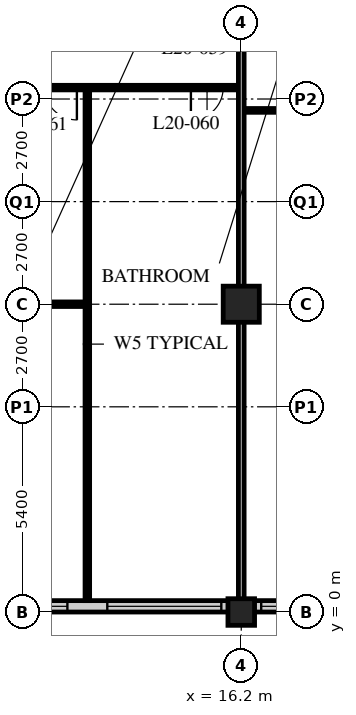
"""IFC4 building model, lengths in metres.
Left out: names, types, materials, properties, quantities, classifications, styles, units other than length and angle.
Written with IfcOpenShell. Run it as: python <this file> out.ifc"""

import sys

from ifc_helpers import new_model, si_unit, direction, frame, frame_2d, origin, origin_2d, place, context, subcontext, project, spatial, rectangle, hollow_rectangle, extrude, element, fill, save


model = new_model("IFC4")
c1 = context("Model", 3, precision=1e-05, world=origin(), true_north=direction((0.0, 1.0)))
c2 = subcontext(c1, "Body", "Model", "MODEL_VIEW")
j1 = project(units=[si_unit("LENGTHUNIT", "METRE"), si_unit("PLANEANGLEUNIT", "RADIAN")], contexts=[c1])
p1 = place(None, origin())
s1 = spatial("IfcSite", under=j1, at=p1, CompositionType="ELEMENT")
p2 = place(p1, origin())
s2 = spatial("IfcBuilding", under=s1, at=p2, CompositionType="ELEMENT")
p3 = place(p2, frame((0.0, 0.0, 80.6)))
s3 = spatial("IfcBuildingStorey", under=s2, at=p3, CompositionType="ELEMENT", Elevation=80.6)
p4 = place(p3, frame((16.2, 0.0, 0.0), z_axis=(0.0, 0.0, 1.0), x_axis=(1.0, 0.0, 0.0)))
e1 = element("IfcColumn", 1, at=p4, inside=s3, PredefinedType="COLUMN", context=c2, shape_type="SweptSolid", body=[
    extrude(hollow_rectangle(XDim=0.7, YDim=0.7, WallThickness=0.06, at=origin_2d()), origin(), (0.0, 0.0, 1.0), 3.4),
])
p5 = place(p3, frame((16.2, 8.1, 0.0), z_axis=(0.0, 0.0, 1.0), x_axis=(1.0, 0.0, 0.0)))
e2 = element("IfcColumn", 2, at=p5, inside=s3, PredefinedType="COLUMN", context=c2, shape_type="SweptSolid", body=[
    extrude(hollow_rectangle(XDim=0.95, YDim=0.95, WallThickness=0.095, at=origin_2d()), origin(), (0.0, 0.0, 1.0), 3.4),
])
p6 = place(p3, frame((8.4, 0.15, 0.0), z_axis=(0.0, 0.0, 1.0), x_axis=(1.0, 0.0, 0.0)))
e3 = element("IfcWall", 3, at=p6, inside=s3, PredefinedType="SOLIDWALL", context=c2, shape_type="SweptSolid", body=[
    extrude(rectangle(XDim=40.2, YDim=0.3, at=frame_2d((20.1, 0.0))), origin(), (0.0, 0.0, 1.0), 3.19),
])
p7 = place(p6, frame((0.225, 0.0, 0.9)))
e4 = element("IfcOpeningElement", 4, at=p7, cuts=e3, PredefinedType="OPENING", context=c2, shape_type="SweptSolid", body=[
    extrude(rectangle(XDim=3.0, YDim=1.5, at=frame_2d((1.5, 0.75))), frame((0.0, 0.16, 0.0), z_axis=(0.0, -1.0, 0.0), x_axis=(1.0, 0.0, 0.0)), (0.0, 0.0, 1.0), 0.32),
])
p8 = place(p6, frame((4.275, 0.0, 0.9)))
e5 = element("IfcOpeningElement", 5, at=p8, cuts=e3, PredefinedType="OPENING", context=c2, shape_type="SweptSolid", body=[
    extrude(rectangle(XDim=3.0, YDim=1.5, at=frame_2d((1.5, 0.75))), frame((0.0, 0.16, 0.0), z_axis=(0.0, -1.0, 0.0), x_axis=(1.0, 0.0, 0.0)), (0.0, 0.0, 1.0), 0.32),
])
p9 = place(p6, frame((8.325, 0.0, 0.9)))
e6 = element("IfcOpeningElement", 6, at=p9, cuts=e3, PredefinedType="OPENING", context=c2, shape_type="SweptSolid", body=[
    extrude(rectangle(XDim=3.0, YDim=1.5, at=frame_2d((1.5, 0.75))), frame((0.0, 0.16, 0.0), z_axis=(0.0, -1.0, 0.0), x_axis=(1.0, 0.0, 0.0)), (0.0, 0.0, 1.0), 0.32),
])
p10 = place(p6, frame((12.375, 0.0, 0.9)))
e7 = element("IfcOpeningElement", 7, at=p10, cuts=e3, PredefinedType="OPENING", context=c2, shape_type="SweptSolid", body=[
    extrude(rectangle(XDim=3.0, YDim=1.5, at=frame_2d((1.5, 0.75))), frame((0.0, 0.16, 0.0), z_axis=(0.0, -1.0, 0.0), x_axis=(1.0, 0.0, 0.0)), (0.0, 0.0, 1.0), 0.32),
])
p11 = place(p6, frame((16.425, 0.0, 0.9)))
e8 = element("IfcOpeningElement", 8, at=p11, cuts=e3, PredefinedType="OPENING", context=c2, shape_type="SweptSolid", body=[
    extrude(rectangle(XDim=3.0, YDim=1.5, at=frame_2d((1.5, 0.75))), frame((0.0, 0.16, 0.0), z_axis=(0.0, -1.0, 0.0), x_axis=(1.0, 0.0, 0.0)), (0.0, 0.0, 1.0), 0.32),
])
p12 = place(p6, frame((20.475, 0.0, 0.9)))
e9 = element("IfcOpeningElement", 9, at=p12, cuts=e3, PredefinedType="OPENING", context=c2, shape_type="SweptSolid", body=[
    extrude(rectangle(XDim=3.0, YDim=1.5, at=frame_2d((1.5, 0.75))), frame((0.0, 0.16, 0.0), z_axis=(0.0, -1.0, 0.0), x_axis=(1.0, 0.0, 0.0)), (0.0, 0.0, 1.0), 0.32),
])
p13 = place(p6, frame((24.525, 0.0, 0.9)))
e10 = element("IfcOpeningElement", 10, at=p13, cuts=e3, PredefinedType="OPENING", context=c2, shape_type="SweptSolid", body=[
    extrude(rectangle(XDim=3.0, YDim=1.5, at=frame_2d((1.5, 0.75))), frame((0.0, 0.16, 0.0), z_axis=(0.0, -1.0, 0.0), x_axis=(1.0, 0.0, 0.0)), (0.0, 0.0, 1.0), 0.32),
])
p14 = place(p6, frame((28.575, 0.0, 0.9)))
e11 = element("IfcOpeningElement", 11, at=p14, cuts=e3, PredefinedType="OPENING", context=c2, shape_type="SweptSolid", body=[
    extrude(rectangle(XDim=3.0, YDim=1.5, at=frame_2d((1.5, 0.75))), frame((0.0, 0.16, 0.0), z_axis=(0.0, -1.0, 0.0), x_axis=(1.0, 0.0, 0.0)), (0.0, 0.0, 1.0), 0.32),
])
p15 = place(p6, frame((32.625, 0.0, 0.9)))
e12 = element("IfcOpeningElement", 12, at=p15, cuts=e3, PredefinedType="OPENING", context=c2, shape_type="SweptSolid", body=[
    extrude(rectangle(XDim=3.0, YDim=1.5, at=frame_2d((1.5, 0.75))), frame((0.0, 0.16, 0.0), z_axis=(0.0, -1.0, 0.0), x_axis=(1.0, 0.0, 0.0)), (0.0, 0.0, 1.0), 0.32),
])
p16 = place(p6, frame((36.675, 0.0, 0.9)))
e13 = element("IfcOpeningElement", 13, at=p16, cuts=e3, PredefinedType="OPENING", context=c2, shape_type="SweptSolid", body=[
    extrude(rectangle(XDim=3.0, YDim=1.5, at=frame_2d((1.5, 0.75))), frame((0.0, 0.16, 0.0), z_axis=(0.0, -1.0, 0.0), x_axis=(1.0, 0.0, 0.0)), (0.0, 0.0, 1.0), 0.32),
])
p17 = place(p3, frame((16.2, 13.2, 0.0), z_axis=(0.0, 0.0, 1.0), x_axis=(1.0, 0.0, 0.0)))
e14 = element("IfcWall", 14, at=p17, inside=s3, PredefinedType="PARTITIONING", context=c2, shape_type="SweptSolid", body=[
    extrude(rectangle(XDim=2.3, YDim=0.1, at=frame_2d((1.15, 0.0))), origin(), (0.0, 0.0, 1.0), 3.19),
])
p18 = place(p3, frame((8.15, 13.8, 0.0), z_axis=(0.0, 0.0, 1.0), x_axis=(1.0, 0.0, 0.0)))
e15 = element("IfcWall", 15, at=p18, inside=s3, PredefinedType="PARTITIONING", context=c2, shape_type="SweptSolid", body=[
    extrude(rectangle(XDim=8.05, YDim=0.12, at=frame_2d((4.025, 0.0))), origin(), (0.0, 0.0, 1.0), 3.19),
])
p19 = place(p18, frame((6.725, 0.0, 0.0)))
e16 = element("IfcOpeningElement", 16, at=p19, cuts=e15, PredefinedType="OPENING", context=c2, shape_type="SweptSolid", body=[
    extrude(rectangle(XDim=0.85, YDim=2.1, at=frame_2d((0.425, 1.05))), frame((0.0, 0.07, 0.0), z_axis=(0.0, -1.0, 0.0), x_axis=(1.0, 0.0, 0.0)), (0.0, 0.0, 1.0), 0.14),
])
p20 = place(p18, frame((2.875, 0.0, 0.0)))
e17 = element("IfcOpeningElement", 17, at=p20, cuts=e15, PredefinedType="OPENING", context=c2, shape_type="SweptSolid", body=[
    extrude(rectangle(XDim=0.85, YDim=2.1, at=frame_2d((0.425, 1.05))), frame((0.0, 0.07, 0.0), z_axis=(0.0, -1.0, 0.0), x_axis=(1.0, 0.0, 0.0)), (0.0, 0.0, 1.0), 0.14),
])
p21 = place(p3, frame((12.15, 13.8, 0.0), z_axis=(0.0, 0.0, 1.0), x_axis=(0.0, -1.0, 0.0)))
e18 = element("IfcWall", 18, at=p21, inside=s3, PredefinedType="PARTITIONING", context=c2, shape_type="SweptSolid", body=[
    extrude(rectangle(XDim=13.5, YDim=0.12, at=frame_2d((6.75, 0.0))), origin(), (0.0, 0.0, 1.0), 3.19),
])
p22 = place(p3, frame((16.2, 16.2, 0.0), z_axis=(0.0, 0.0, 1.0), x_axis=(0.0, -1.0, 0.0)))
e19 = element("IfcWall", 19, at=p22, inside=s3, PredefinedType="PARTITIONING", context=c2, shape_type="SweptSolid", body=[
    extrude(rectangle(XDim=15.9, YDim=0.15, at=frame_2d((7.95, 0.0))), origin(), (0.0, 0.0, 1.0), 2.428),
])
p23 = place(p3, frame((12.15, 8.1, 0.0), z_axis=(0.0, 0.0, 1.0), x_axis=(-1.0, 0.0, 0.0)))
e20 = element("IfcWall", 20, at=p23, inside=s3, PredefinedType="PARTITIONING", context=c2, shape_type="SweptSolid", body=[
    extrude(rectangle(XDim=3.575, YDim=0.12, at=frame_2d((1.788, 0.0))), origin(), (0.0, 0.0, 1.0), 2.428),
])
p24 = place(p7, origin())
e21 = element("IfcWindow", 21, at=p24, inside=s3, PartitioningType="SINGLE_PANEL", PredefinedType="WINDOW", context=c2, shape_type="SweptSolid", body=[
    extrude(rectangle(XDim=3.0, YDim=1.5, at=frame_2d((1.5, 0.75))), frame((0.0, 0.03, 0.0), z_axis=(0.0, -1.0, 0.0), x_axis=(1.0, 0.0, 0.0)), (0.0, 0.0, 1.0), 0.06),
])
fill(e4, e21)
p25 = place(p8, origin())
e22 = element("IfcWindow", 22, at=p25, inside=s3, PartitioningType="SINGLE_PANEL", PredefinedType="WINDOW", context=c2, shape_type="SweptSolid", body=[
    extrude(rectangle(XDim=3.0, YDim=1.5, at=frame_2d((1.5, 0.75))), frame((0.0, 0.03, 0.0), z_axis=(0.0, -1.0, 0.0), x_axis=(1.0, 0.0, 0.0)), (0.0, 0.0, 1.0), 0.06),
])
fill(e5, e22)
p26 = place(p9, origin())
e23 = element("IfcWindow", 23, at=p26, inside=s3, PartitioningType="SINGLE_PANEL", PredefinedType="WINDOW", context=c2, shape_type="SweptSolid", body=[
    extrude(rectangle(XDim=3.0, YDim=1.5, at=frame_2d((1.5, 0.75))), frame((0.0, 0.03, 0.0), z_axis=(0.0, -1.0, 0.0), x_axis=(1.0, 0.0, 0.0)), (0.0, 0.0, 1.0), 0.06),
])
fill(e6, e23)
p27 = place(p19, origin())
e24 = element("IfcDoor", 24, at=p27, inside=s3, OperationType="SINGLE_SWING_RIGHT", PredefinedType="DOOR", context=c2, shape_type="SweptSolid", body=[
    extrude(rectangle(XDim=0.85, YDim=2.1, at=frame_2d((0.425, 1.05))), frame((0.0, 0.025, 0.0), z_axis=(0.0, -1.0, 0.0), x_axis=(1.0, 0.0, 0.0)), (0.0, 0.0, 1.0), 0.05),
])
fill(e16, e24)
p28 = place(p20, origin())
e25 = element("IfcDoor", 25, at=p28, inside=s3, OperationType="SINGLE_SWING_LEFT", PredefinedType="DOOR", context=c2, shape_type="SweptSolid", body=[
    extrude(rectangle(XDim=0.85, YDim=2.1, at=frame_2d((0.425, 1.05))), frame((0.0, 0.025, 0.0), z_axis=(0.0, -1.0, 0.0), x_axis=(1.0, 0.0, 0.0)), (0.0, 0.0, 1.0), 0.05),
])
fill(e17, e25)
save(model, sys.argv[1])
